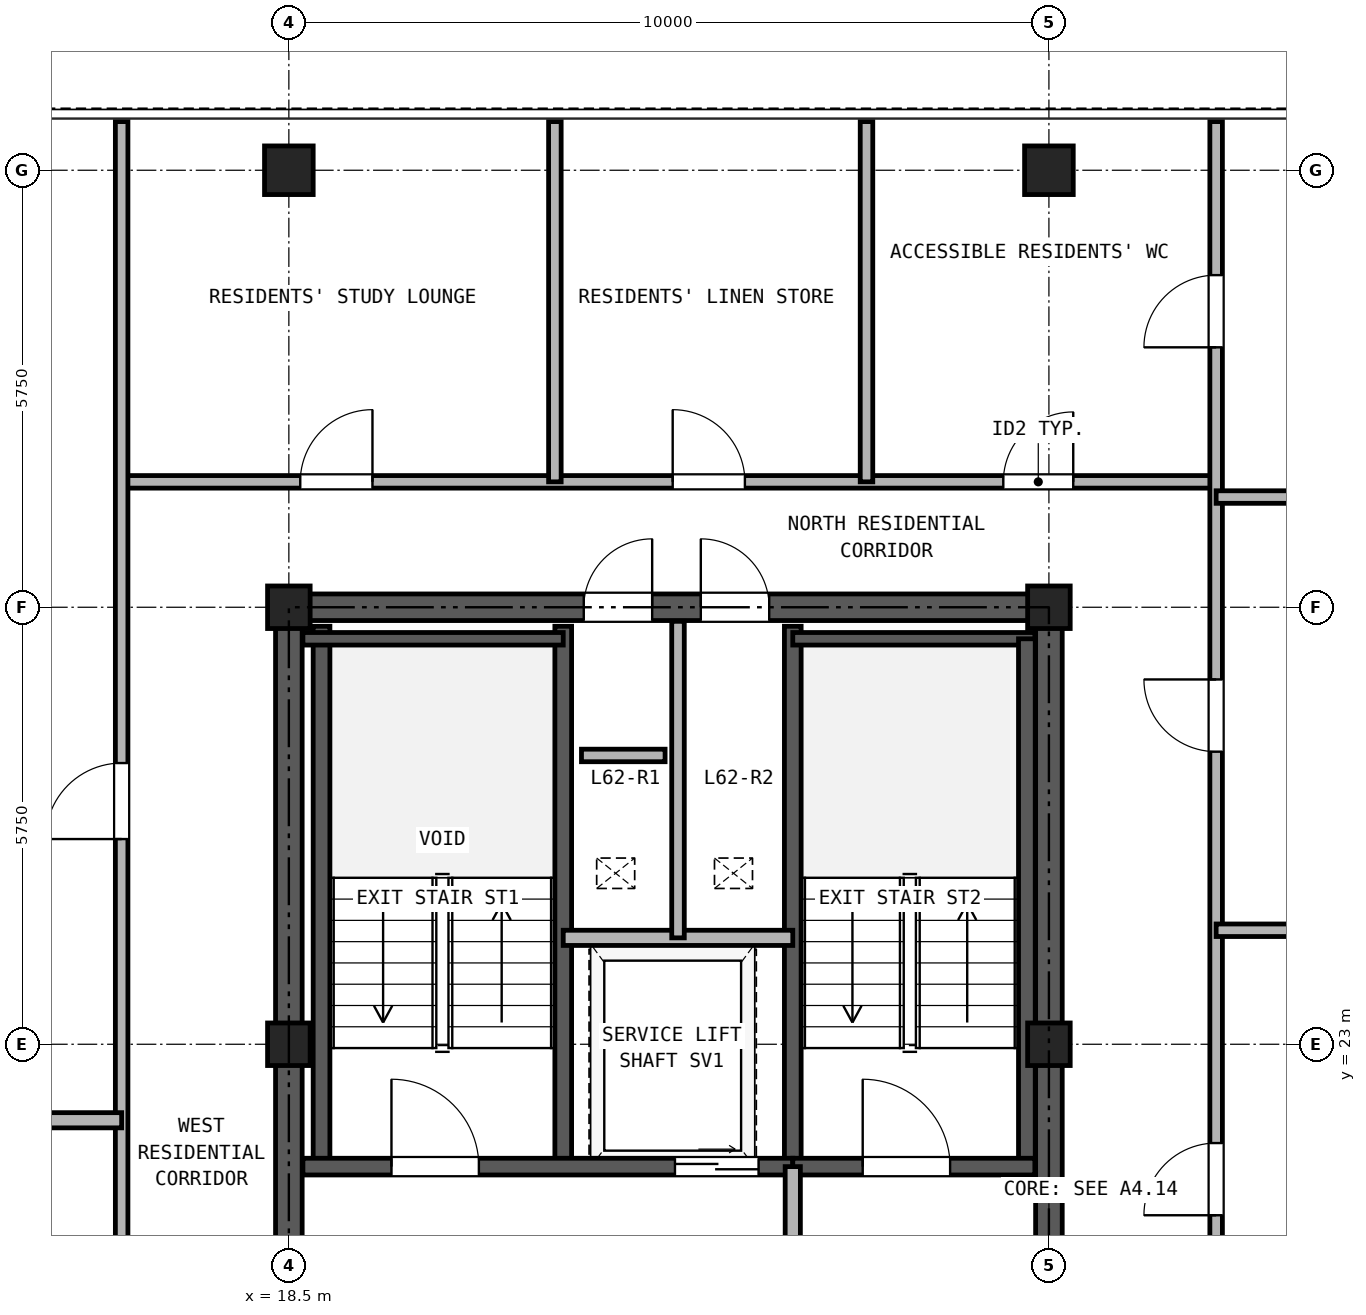
"""IFC4 building model, lengths in metres.
Left out: names, types, materials, properties, quantities, classifications, styles, units other than length and angle.
Written with IfcOpenShell. Run it as: python <this file> out.ifc"""

import sys

from ifc_helpers import new_model, si_unit, direction, frame, frame_2d, origin, origin_2d, place, context, subcontext, project, spatial, rectangle, hollow_rectangle, extrude, source, transform, mapped, element, fill, save


model = new_model("IFC4")
c1 = context("Model", 3, precision=1e-05, world=origin(), true_north=direction((0.0, 1.0)))
c2 = subcontext(c1, "Body", "Model", "MODEL_VIEW")
j1 = project(units=[si_unit("LENGTHUNIT", "METRE"), si_unit("PLANEANGLEUNIT", "RADIAN")], contexts=[c1])
p1 = place(None, origin())
s1 = spatial("IfcSite", under=j1, at=p1, CompositionType="ELEMENT")
p2 = place(p1, origin())
s2 = spatial("IfcBuilding", under=s1, at=p2, CompositionType="ELEMENT")
p3 = place(p2, frame((0.0, 0.0, 220.1)))
s3 = spatial("IfcBuildingStorey", under=s2, at=p3, CompositionType="ELEMENT", Elevation=220.1)
m1 = source(origin(), c2, "Body", "SweptSolid", [
    extrude(hollow_rectangle(XDim=0.64, YDim=0.64, WallThickness=0.035, at=origin_2d()), origin(), (0.0, 0.0, 1.0), 2.98),
])
for number, where, z_axis, x_axis in (
    (1, (18.5, 34.5, 0.0), (0.0, 0.0, 1.0), (1.0, 0.0, 0.0)),
    (2, (28.5, 34.5, 0.0), (0.0, 0.0, 1.0), (1.0, 0.0, 0.0)),
):
    element("IfcColumn", number, at=place(p3, frame(where, z_axis=z_axis, x_axis=x_axis)), inside=s3, PredefinedType="COLUMN", context=c2, shape_type="MappedRepresentation", body=[
        mapped(m1, transform((0.0, 0.0, 0.0), x_axis=(1.0, 0.0, 0.0), y_axis=(0.0, 1.0, 0.0), z_axis=(0.0, 0.0, 1.0), scale=1.0)),
    ])
m2 = source(origin(), c2, "Body", "SweptSolid", [
    extrude(hollow_rectangle(XDim=0.56, YDim=0.56, WallThickness=0.03, at=origin_2d()), origin(), (0.0, 0.0, 1.0), 2.98),
])
for number, where, z_axis, x_axis in (
    (3, (18.5, 23.0, 0.0), (0.0, 0.0, 1.0), (1.0, 0.0, 0.0)),
    (4, (18.5, 28.75, 0.0), (0.0, 0.0, 1.0), (1.0, 0.0, 0.0)),
    (5, (28.5, 23.0, 0.0), (0.0, 0.0, 1.0), (1.0, 0.0, 0.0)),
    (6, (28.5, 28.75, 0.0), (0.0, 0.0, 1.0), (1.0, 0.0, 0.0)),
):
    element("IfcColumn", number, at=place(p3, frame(where, z_axis=z_axis, x_axis=x_axis)), inside=s3, PredefinedType="COLUMN", context=c2, shape_type="MappedRepresentation", body=[
        mapped(m2, transform((0.0, 0.0, 0.0), x_axis=(1.0, 0.0, 0.0), y_axis=(0.0, 1.0, 0.0), z_axis=(0.0, 0.0, 1.0), scale=1.0)),
    ])
p4 = place(p3, frame((18.325, 28.75, 0.0), z_axis=(0.0, 0.0, 1.0), x_axis=(1.0, 0.0, 0.0)))
e7 = element("IfcWall", 7, at=p4, inside=s3, PredefinedType="SHEAR", context=c2, shape_type="SweptSolid", body=[
    extrude(rectangle(XDim=10.35, YDim=0.35, at=frame_2d((5.175, 0.0))), origin(), (0.0, 0.0, 1.0), 2.98),
])
p5 = place(p4, frame((4.055, 0.0, 0.0)))
e8 = element("IfcOpeningElement", 8, at=p5, cuts=e7, PredefinedType="OPENING", context=c2, shape_type="SweptSolid", body=[
    extrude(rectangle(XDim=0.9, YDim=2.05, at=frame_2d((0.45, 1.025))), frame((0.0, 0.185, 0.0), z_axis=(0.0, -1.0, 0.0), x_axis=(1.0, 0.0, 0.0)), (0.0, 0.0, 1.0), 0.37),
])
p6 = place(p4, frame((5.595, 0.0, 0.0)))
e9 = element("IfcOpeningElement", 9, at=p6, cuts=e7, PredefinedType="OPENING", context=c2, shape_type="SweptSolid", body=[
    extrude(rectangle(XDim=0.9, YDim=2.05, at=frame_2d((0.45, 1.025))), frame((0.0, 0.185, 0.0), z_axis=(0.0, -1.0, 0.0), x_axis=(1.0, 0.0, 0.0)), (0.0, 0.0, 1.0), 0.37),
])
p7 = place(p3, frame((18.5, 11.675, 0.0), z_axis=(0.0, 0.0, 1.0), x_axis=(0.0, 1.0, 0.0)))
e10 = element("IfcWall", 10, at=p7, inside=s3, PredefinedType="SHEAR", context=c2, shape_type="SweptSolid", body=[
    extrude(rectangle(XDim=16.9, YDim=0.35, at=frame_2d((8.45, 0.0))), origin(), (0.0, 0.0, 1.0), 2.98),
])
p8 = place(p7, frame((7.475, 0.0, 0.0)))
e11 = element("IfcOpeningElement", 11, at=p8, cuts=e10, PredefinedType="OPENING", context=c2, shape_type="SweptSolid", body=[
    extrude(rectangle(XDim=1.15, YDim=2.2, at=frame_2d((0.575, 1.1))), frame((0.0, 0.185, 0.0), z_axis=(0.0, -1.0, 0.0), x_axis=(1.0, 0.0, 0.0)), (0.0, 0.0, 1.0), 0.37),
])
p9 = place(p3, frame((28.5, 11.675, 0.0), z_axis=(0.0, 0.0, 1.0), x_axis=(0.0, 1.0, 0.0)))
e12 = element("IfcWall", 12, at=p9, inside=s3, PredefinedType="SHEAR", context=c2, shape_type="SweptSolid", body=[
    extrude(rectangle(XDim=16.9, YDim=0.35, at=frame_2d((8.45, 0.0))), origin(), (0.0, 0.0, 1.0), 2.98),
])
p10 = place(p9, frame((7.475, 0.0, 0.0)))
e13 = element("IfcOpeningElement", 13, at=p10, cuts=e12, PredefinedType="OPENING", context=c2, shape_type="SweptSolid", body=[
    extrude(rectangle(XDim=1.15, YDim=2.2, at=frame_2d((0.575, 1.1))), frame((0.0, 0.185, 0.0), z_axis=(0.0, -1.0, 0.0), x_axis=(1.0, 0.0, 0.0)), (0.0, 0.0, 1.0), 0.37),
])
for number, where, z_axis, x_axis in (
    (14, (18.93, 21.39, 0.0), (0.0, 0.0, 1.0), (0.0, 1.0, 0.0)),
    (15, (22.11, 21.39, 0.0), (0.0, 0.0, 1.0), (0.0, 1.0, 0.0)),
    (16, (25.13, 21.39, 0.0), (0.0, 0.0, 1.0), (0.0, 1.0, 0.0)),
):
    element("IfcWall", number, at=place(p3, frame(where, z_axis=z_axis, x_axis=x_axis)), inside=s3, PredefinedType="SOLIDWALL", context=c2, shape_type="SweptSolid", body=[
        extrude(rectangle(XDim=7.11, YDim=0.22, at=frame_2d((3.555, 0.0))), origin(), (0.0, 0.0, 1.0), 2.98),
    ])
p11 = place(p3, frame((18.685, 28.335, 0.0), z_axis=(0.0, 0.0, 1.0), x_axis=(1.0, 0.0, 0.0)))
e17 = element("IfcWall", 17, at=p11, inside=s3, PredefinedType="PARTITIONING", context=c2, shape_type="SweptSolid", body=[
    extrude(rectangle(XDim=3.425, YDim=0.165, at=frame_2d((1.712, 0.0))), origin(), (0.0, 0.0, 1.0), 2.98),
])
p12 = place(p3, frame((25.13, 28.335, 0.0), z_axis=(0.0, 0.0, 1.0), x_axis=(1.0, 0.0, 0.0)))
e18 = element("IfcWall", 18, at=p12, inside=s3, PredefinedType="PARTITIONING", context=c2, shape_type="SweptSolid", body=[
    extrude(rectangle(XDim=3.185, YDim=0.165, at=frame_2d((1.593, 0.0))), origin(), (0.0, 0.0, 1.0), 2.98),
])
p13 = place(p3, frame((28.21, 21.39, 0.0), z_axis=(0.0, 0.0, 1.0), x_axis=(0.0, 1.0, 0.0)))
e19 = element("IfcWall", 19, at=p13, inside=s3, PredefinedType="SOLIDWALL", context=c2, shape_type="SweptSolid", body=[
    extrude(rectangle(XDim=6.945, YDim=0.22, at=frame_2d((3.473, 0.0))), origin(), (0.0, 0.0, 1.0), 2.98),
])
p14 = place(p3, frame((18.685, 21.39, 0.0), z_axis=(0.0, 0.0, 1.0), x_axis=(1.0, 0.0, 0.0)))
e20 = element("IfcWall", 20, at=p14, inside=s3, PredefinedType="SOLIDWALL", context=c2, shape_type="SweptSolid", body=[
    extrude(rectangle(XDim=6.445, YDim=0.22, at=frame_2d((3.222, 0.0))), origin(), (0.0, 0.0, 1.0), 2.98),
])
p15 = place(p14, frame((1.165, 0.0, 0.0)))
e21 = element("IfcOpeningElement", 21, at=p15, cuts=e20, PredefinedType="OPENING", context=c2, shape_type="SweptSolid", body=[
    extrude(rectangle(XDim=1.15, YDim=2.2, at=frame_2d((0.575, 1.1))), frame((0.0, 0.12, 0.0), z_axis=(0.0, -1.0, 0.0), x_axis=(1.0, 0.0, 0.0)), (0.0, 0.0, 1.0), 0.24),
])
p16 = place(p14, frame((4.895, 0.0, 0.0)))
e22 = element("IfcOpeningElement", 22, at=p16, cuts=e20, PredefinedType="OPENING", context=c2, shape_type="SweptSolid", body=[
    extrude(rectangle(XDim=1.1, YDim=2.25, at=frame_2d((0.55, 1.125))), frame((0.0, 0.12, 0.0), z_axis=(0.0, -1.0, 0.0), x_axis=(1.0, 0.0, 0.0)), (0.0, 0.0, 1.0), 0.24),
])
p17 = place(p3, frame((25.13, 21.39, 0.0), z_axis=(0.0, 0.0, 1.0), x_axis=(1.0, 0.0, 0.0)))
e23 = element("IfcWall", 23, at=p17, inside=s3, PredefinedType="SOLIDWALL", context=c2, shape_type="SweptSolid", body=[
    extrude(rectangle(XDim=3.185, YDim=0.22, at=frame_2d((1.593, 0.0))), origin(), (0.0, 0.0, 1.0), 2.98),
])
p18 = place(p17, frame((0.92, 0.0, 0.0)))
e24 = element("IfcOpeningElement", 24, at=p18, cuts=e23, PredefinedType="OPENING", context=c2, shape_type="SweptSolid", body=[
    extrude(rectangle(XDim=1.15, YDim=2.2, at=frame_2d((0.575, 1.1))), frame((0.0, 0.12, 0.0), z_axis=(0.0, -1.0, 0.0), x_axis=(1.0, 0.0, 0.0)), (0.0, 0.0, 1.0), 0.24),
])
p19 = place(p3, frame((22.11, 24.4, 0.0), z_axis=(0.0, 0.0, 1.0), x_axis=(1.0, 0.0, 0.0)))
e25 = element("IfcWall", 25, at=p19, inside=s3, PredefinedType="PARTITIONING", context=c2, shape_type="SweptSolid", body=[
    extrude(rectangle(XDim=3.02, YDim=0.2, at=frame_2d((1.51, 0.0))), origin(), (0.0, 0.0, 1.0), 2.98),
])
p20 = place(p3, frame((23.62, 24.4, 0.0), z_axis=(0.0, 0.0, 1.0), x_axis=(0.0, 1.0, 0.0)))
e26 = element("IfcWall", 26, at=p20, inside=s3, PredefinedType="PARTITIONING", context=c2, shape_type="SweptSolid", body=[
    extrude(rectangle(XDim=4.165, YDim=0.165, at=frame_2d((2.083, 0.0))), origin(), (0.0, 0.0, 1.0), 2.98),
])
p21 = place(p3, frame((25.13, 18.0, 0.0), z_axis=(0.0, 0.0, 1.0), x_axis=(0.0, 1.0, 0.0)))
e27 = element("IfcWall", 27, at=p21, inside=s3, PredefinedType="PARTITIONING", context=c2, shape_type="SweptSolid", body=[
    extrude(rectangle(XDim=3.39, YDim=0.2, at=frame_2d((1.695, 0.0))), origin(), (0.0, 0.0, 1.0), 2.98),
])
p22 = place(p21, frame((1.1, 0.0, 0.0)))
e28 = element("IfcOpeningElement", 28, at=p22, cuts=e27, PredefinedType="OPENING", context=c2, shape_type="SweptSolid", body=[
    extrude(rectangle(XDim=1.15, YDim=2.2, at=frame_2d((0.575, 1.1))), frame((0.0, 0.11, 0.0), z_axis=(0.0, -1.0, 0.0), x_axis=(1.0, 0.0, 0.0)), (0.0, 0.0, 1.0), 0.22),
])
p23 = place(p3, frame((16.3, 30.4, 0.0), z_axis=(0.0, 0.0, 1.0), x_axis=(1.0, 0.0, 0.0)))
e29 = element("IfcWall", 29, at=p23, inside=s3, PredefinedType="PARTITIONING", context=c2, shape_type="SweptSolid", body=[
    extrude(rectangle(XDim=14.4, YDim=0.165, at=frame_2d((7.2, 0.0))), origin(), (0.0, 0.0, 1.0), 2.98),
])
p24 = place(p23, frame((2.35, 0.0, 0.0)))
e30 = element("IfcOpeningElement", 30, at=p24, cuts=e29, PredefinedType="OPENING", context=c2, shape_type="SweptSolid", body=[
    extrude(rectangle(XDim=0.95, YDim=2.15, at=frame_2d((0.475, 1.075))), frame((0.0, 0.093, 0.0), z_axis=(0.0, -1.0, 0.0), x_axis=(1.0, 0.0, 0.0)), (0.0, 0.0, 1.0), 0.185),
])
p25 = place(p23, frame((7.25, 0.0, 0.0)))
e31 = element("IfcOpeningElement", 31, at=p25, cuts=e29, PredefinedType="OPENING", context=c2, shape_type="SweptSolid", body=[
    extrude(rectangle(XDim=0.95, YDim=2.15, at=frame_2d((0.475, 1.075))), frame((0.0, 0.093, 0.0), z_axis=(0.0, -1.0, 0.0), x_axis=(1.0, 0.0, 0.0)), (0.0, 0.0, 1.0), 0.185),
])
p26 = place(p23, frame((11.6, 0.0, 0.0)))
e32 = element("IfcOpeningElement", 32, at=p26, cuts=e29, PredefinedType="OPENING", context=c2, shape_type="SweptSolid", body=[
    extrude(rectangle(XDim=0.92, YDim=2.1, at=frame_2d((0.46, 1.05))), frame((0.0, 0.093, 0.0), z_axis=(0.0, -1.0, 0.0), x_axis=(1.0, 0.0, 0.0)), (0.0, 0.0, 1.0), 0.185),
])
p27 = place(p3, frame((16.3, 10.9, 0.0), z_axis=(0.0, 0.0, 1.0), x_axis=(0.0, 1.0, 0.0)))
e33 = element("IfcWall", 33, at=p27, inside=s3, PredefinedType="PARTITIONING", context=c2, shape_type="SweptSolid", body=[
    extrude(rectangle(XDim=24.24, YDim=0.165, at=frame_2d((12.12, 0.0))), origin(), (0.0, 0.0, 1.0), 2.98),
])
p28 = place(p27, frame((5.05, 0.0, 0.0)))
e34 = element("IfcOpeningElement", 34, at=p28, cuts=e33, PredefinedType="OPENING", context=c2, shape_type="SweptSolid", body=[
    extrude(rectangle(XDim=1.0, YDim=2.15, at=frame_2d((0.5, 1.075))), frame((0.0, 0.093, 0.0), z_axis=(0.0, -1.0, 0.0), x_axis=(1.0, 0.0, 0.0)), (0.0, 0.0, 1.0), 0.185),
])
p29 = place(p27, frame((14.8, 0.0, 0.0)))
e35 = element("IfcOpeningElement", 35, at=p29, cuts=e33, PredefinedType="OPENING", context=c2, shape_type="SweptSolid", body=[
    extrude(rectangle(XDim=1.0, YDim=2.15, at=frame_2d((0.5, 1.075))), frame((0.0, 0.093, 0.0), z_axis=(0.0, -1.0, 0.0), x_axis=(1.0, 0.0, 0.0)), (0.0, 0.0, 1.0), 0.185),
])
p30 = place(p3, frame((30.7, 10.9, 0.0), z_axis=(0.0, 0.0, 1.0), x_axis=(0.0, 1.0, 0.0)))
e36 = element("IfcWall", 36, at=p30, inside=s3, PredefinedType="PARTITIONING", context=c2, shape_type="SweptSolid", body=[
    extrude(rectangle(XDim=24.24, YDim=0.165, at=frame_2d((12.12, 0.0))), origin(), (0.0, 0.0, 1.0), 2.98),
])
p31 = place(p30, frame((3.05, 0.0, 0.0)))
e37 = element("IfcOpeningElement", 37, at=p31, cuts=e36, PredefinedType="OPENING", context=c2, shape_type="SweptSolid", body=[
    extrude(rectangle(XDim=0.95, YDim=2.15, at=frame_2d((0.475, 1.075))), frame((0.0, 0.093, 0.0), z_axis=(0.0, -1.0, 0.0), x_axis=(1.0, 0.0, 0.0)), (0.0, 0.0, 1.0), 0.185),
])
p32 = place(p30, frame((9.85, 0.0, 0.0)))
e38 = element("IfcOpeningElement", 38, at=p32, cuts=e36, PredefinedType="OPENING", context=c2, shape_type="SweptSolid", body=[
    extrude(rectangle(XDim=0.95, YDim=2.15, at=frame_2d((0.475, 1.075))), frame((0.0, 0.093, 0.0), z_axis=(0.0, -1.0, 0.0), x_axis=(1.0, 0.0, 0.0)), (0.0, 0.0, 1.0), 0.185),
])
p33 = place(p30, frame((15.95, 0.0, 0.0)))
e39 = element("IfcOpeningElement", 39, at=p33, cuts=e36, PredefinedType="OPENING", context=c2, shape_type="SweptSolid", body=[
    extrude(rectangle(XDim=0.95, YDim=2.15, at=frame_2d((0.475, 1.075))), frame((0.0, 0.093, 0.0), z_axis=(0.0, -1.0, 0.0), x_axis=(1.0, 0.0, 0.0)), (0.0, 0.0, 1.0), 0.185),
])
p34 = place(p30, frame((21.27, 0.0, 0.0)))
e40 = element("IfcOpeningElement", 40, at=p34, cuts=e36, PredefinedType="OPENING", context=c2, shape_type="SweptSolid", body=[
    extrude(rectangle(XDim=0.95, YDim=2.15, at=frame_2d((0.475, 1.075))), frame((0.0, 0.093, 0.0), z_axis=(0.0, -1.0, 0.0), x_axis=(1.0, 0.0, 0.0)), (0.0, 0.0, 1.0), 0.185),
])
p35 = place(p3, frame((5.36, 22.0, 0.0), z_axis=(0.0, 0.0, 1.0), x_axis=(1.0, 0.0, 0.0)))
e41 = element("IfcWall", 41, at=p35, inside=s3, PredefinedType="PARTITIONING", context=c2, shape_type="SweptSolid", body=[
    extrude(rectangle(XDim=10.94, YDim=0.2, at=frame_2d((5.47, 0.0))), origin(), (0.0, 0.0, 1.0), 2.98),
])
for number, where, z_axis, x_axis in (
    (42, (30.7, 24.5, 0.0), (0.0, 0.0, 1.0), (1.0, 0.0, 0.0)),
    (43, (30.7, 30.2, 0.0), (0.0, 0.0, 1.0), (1.0, 0.0, 0.0)),
):
    element("IfcWall", number, at=place(p3, frame(where, z_axis=z_axis, x_axis=x_axis)), inside=s3, PredefinedType="PARTITIONING", context=c2, shape_type="SweptSolid", body=[
        extrude(rectangle(XDim=10.94, YDim=0.165, at=frame_2d((5.47, 0.0))), origin(), (0.0, 0.0, 1.0), 2.98),
    ])
for number, where, z_axis, x_axis in (
    (44, (22.0, 30.4, 0.0), (0.0, 0.0, 1.0), (0.0, 1.0, 0.0)),
    (45, (26.1, 30.4, 0.0), (0.0, 0.0, 1.0), (0.0, 1.0, 0.0)),
):
    element("IfcWall", number, at=place(p3, frame(where, z_axis=z_axis, x_axis=x_axis)), inside=s3, PredefinedType="PARTITIONING", context=c2, shape_type="SweptSolid", body=[
        extrude(rectangle(XDim=4.74, YDim=0.165, at=frame_2d((2.37, 0.0))), origin(), (0.0, 0.0, 1.0), 2.98),
    ])
p36 = place(p3, frame((22.35, 26.8, 0.0), z_axis=(0.0, 0.0, 1.0), x_axis=(1.0, 0.0, 0.0)))
e46 = element("IfcWall", 46, at=p36, inside=s3, PredefinedType="PARTITIONING", context=c2, shape_type="SweptSolid", body=[
    extrude(rectangle(XDim=1.1, YDim=0.165, at=frame_2d((0.55, 0.0))), origin(), (0.0, 0.0, 1.0), 2.98),
])
p37 = place(p15, frame((1.15, 0.0, 0.0), z_axis=(0.0, 0.0, 1.0), x_axis=(-1.0, 0.0, 0.0)))
e47 = element("IfcDoor", 47, at=p37, inside=s3, OperationType="SINGLE_SWING_LEFT", PredefinedType="DOOR", context=c2, shape_type="SweptSolid", body=[
    extrude(rectangle(XDim=1.15, YDim=2.2, at=frame_2d((0.575, 1.1))), frame((0.0, 0.025, 0.0), z_axis=(0.0, -1.0, 0.0), x_axis=(1.0, 0.0, 0.0)), (0.0, 0.0, 1.0), 0.05),
])
fill(e21, e47)
p38 = place(p18, frame((1.15, 0.0, 0.0), z_axis=(0.0, 0.0, 1.0), x_axis=(-1.0, 0.0, 0.0)))
e48 = element("IfcDoor", 48, at=p38, inside=s3, OperationType="SINGLE_SWING_LEFT", PredefinedType="DOOR", context=c2, shape_type="SweptSolid", body=[
    extrude(rectangle(XDim=1.15, YDim=2.2, at=frame_2d((0.575, 1.1))), frame((0.0, 0.025, 0.0), z_axis=(0.0, -1.0, 0.0), x_axis=(1.0, 0.0, 0.0)), (0.0, 0.0, 1.0), 0.05),
])
fill(e24, e48)
p39 = place(p16, frame((1.1, 0.0, 0.0), z_axis=(0.0, 0.0, 1.0), x_axis=(-1.0, 0.0, 0.0)))
e49 = element("IfcDoor", 49, at=p39, inside=s3, OperationType="DOUBLE_DOOR_SLIDING", PredefinedType="DOOR", context=c2, shape_type="SweptSolid", body=[
    extrude(rectangle(XDim=1.1, YDim=2.25, at=frame_2d((0.55, 1.125))), frame((0.0, 0.025, 0.0), z_axis=(0.0, -1.0, 0.0), x_axis=(1.0, 0.0, 0.0)), (0.0, 0.0, 1.0), 0.05),
])
fill(e22, e49)
p40 = place(p5, origin())
e50 = element("IfcDoor", 50, at=p40, inside=s3, OperationType="SINGLE_SWING_RIGHT", PredefinedType="DOOR", context=c2, shape_type="SweptSolid", body=[
    extrude(rectangle(XDim=0.9, YDim=2.05, at=frame_2d((0.45, 1.025))), frame((0.0, 0.025, 0.0), z_axis=(0.0, -1.0, 0.0), x_axis=(1.0, 0.0, 0.0)), (0.0, 0.0, 1.0), 0.05),
])
fill(e8, e50)
p41 = place(p6, origin())
e51 = element("IfcDoor", 51, at=p41, inside=s3, OperationType="SINGLE_SWING_LEFT", PredefinedType="DOOR", context=c2, shape_type="SweptSolid", body=[
    extrude(rectangle(XDim=0.9, YDim=2.05, at=frame_2d((0.45, 1.025))), frame((0.0, 0.025, 0.0), z_axis=(0.0, -1.0, 0.0), x_axis=(1.0, 0.0, 0.0)), (0.0, 0.0, 1.0), 0.05),
])
fill(e9, e51)
p42 = place(p29, origin())
e52 = element("IfcDoor", 52, at=p42, inside=s3, OperationType="SINGLE_SWING_LEFT", PredefinedType="DOOR", context=c2, shape_type="SweptSolid", body=[
    extrude(rectangle(XDim=1.0, YDim=2.15, at=frame_2d((0.5, 1.075))), frame((0.0, 0.025, 0.0), z_axis=(0.0, -1.0, 0.0), x_axis=(1.0, 0.0, 0.0)), (0.0, 0.0, 1.0), 0.05),
])
fill(e35, e52)
p43 = place(p32, origin())
e53 = element("IfcDoor", 53, at=p43, inside=s3, OperationType="SINGLE_SWING_LEFT", PredefinedType="DOOR", context=c2, shape_type="SweptSolid", body=[
    extrude(rectangle(XDim=0.95, YDim=2.15, at=frame_2d((0.475, 1.075))), frame((0.0, 0.025, 0.0), z_axis=(0.0, -1.0, 0.0), x_axis=(1.0, 0.0, 0.0)), (0.0, 0.0, 1.0), 0.05),
])
fill(e38, e53)
p44 = place(p33, origin())
e54 = element("IfcDoor", 54, at=p44, inside=s3, OperationType="SINGLE_SWING_RIGHT", PredefinedType="DOOR", context=c2, shape_type="SweptSolid", body=[
    extrude(rectangle(XDim=0.95, YDim=2.15, at=frame_2d((0.475, 1.075))), frame((0.0, 0.025, 0.0), z_axis=(0.0, -1.0, 0.0), x_axis=(1.0, 0.0, 0.0)), (0.0, 0.0, 1.0), 0.05),
])
fill(e39, e54)
p45 = place(p34, origin())
e55 = element("IfcDoor", 55, at=p45, inside=s3, OperationType="SINGLE_SWING_LEFT", PredefinedType="DOOR", context=c2, shape_type="SweptSolid", body=[
    extrude(rectangle(XDim=0.95, YDim=2.15, at=frame_2d((0.475, 1.075))), frame((0.0, 0.025, 0.0), z_axis=(0.0, -1.0, 0.0), x_axis=(1.0, 0.0, 0.0)), (0.0, 0.0, 1.0), 0.05),
])
fill(e40, e55)
p46 = place(p24, origin())
e56 = element("IfcDoor", 56, at=p46, inside=s3, OperationType="SINGLE_SWING_RIGHT", PredefinedType="DOOR", context=c2, shape_type="SweptSolid", body=[
    extrude(rectangle(XDim=0.95, YDim=2.15, at=frame_2d((0.475, 1.075))), frame((0.0, 0.025, 0.0), z_axis=(0.0, -1.0, 0.0), x_axis=(1.0, 0.0, 0.0)), (0.0, 0.0, 1.0), 0.05),
])
fill(e30, e56)
p47 = place(p25, origin())
e57 = element("IfcDoor", 57, at=p47, inside=s3, OperationType="SINGLE_SWING_LEFT", PredefinedType="DOOR", context=c2, shape_type="SweptSolid", body=[
    extrude(rectangle(XDim=0.95, YDim=2.15, at=frame_2d((0.475, 1.075))), frame((0.0, 0.025, 0.0), z_axis=(0.0, -1.0, 0.0), x_axis=(1.0, 0.0, 0.0)), (0.0, 0.0, 1.0), 0.05),
])
fill(e31, e57)
p48 = place(p26, origin())
e58 = element("IfcDoor", 58, at=p48, inside=s3, OperationType="SINGLE_SWING_RIGHT", PredefinedType="DOOR", context=c2, shape_type="SweptSolid", body=[
    extrude(rectangle(XDim=0.92, YDim=2.1, at=frame_2d((0.46, 1.05))), frame((0.0, 0.025, 0.0), z_axis=(0.0, -1.0, 0.0), x_axis=(1.0, 0.0, 0.0)), (0.0, 0.0, 1.0), 0.05),
])
fill(e32, e58)
save(model, sys.argv[1])
